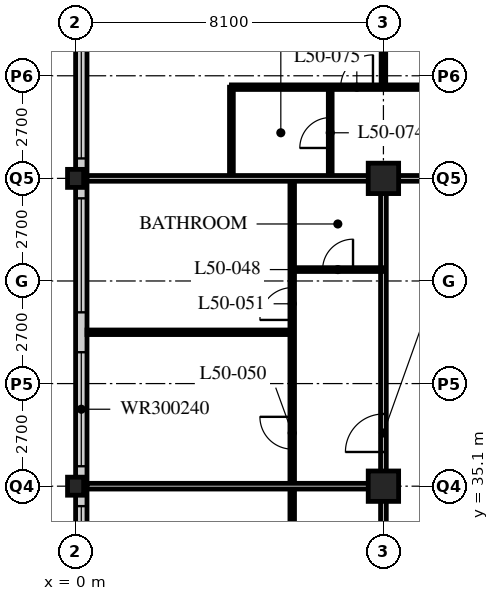
"""IFC4 building model, lengths in metres.
Left out: names, types, materials, properties, quantities, classifications, styles, units other than length and angle.
Written with IfcOpenShell. Run it as: python <this file> out.ifc"""

import sys

from ifc_helpers import new_model, si_unit, direction, frame, frame_2d, origin, origin_2d, place, context, subcontext, project, spatial, rectangle, hollow_rectangle, i_section, extrude, element, fill, save


model = new_model("IFC4")
c1 = context("Model", 3, precision=1e-05, world=origin(), true_north=direction((0.0, 1.0)))
c2 = subcontext(c1, "Body", "Model", "MODEL_VIEW")
j1 = project(units=[si_unit("LENGTHUNIT", "METRE"), si_unit("PLANEANGLEUNIT", "RADIAN")], contexts=[c1])
p1 = place(None, origin())
s1 = spatial("IfcSite", under=j1, at=p1, CompositionType="ELEMENT")
p2 = place(p1, origin())
s2 = spatial("IfcBuilding", under=s1, at=p2, CompositionType="ELEMENT")
p3 = place(p2, frame((0.0, 0.0, 195.6)))
s3 = spatial("IfcBuildingStorey", under=s2, at=p3, CompositionType="ELEMENT", Elevation=195.6)
for number, where, z_axis, x_axis in (
    (1, (0.0, 35.1, 0.0), (0.0, 0.0, 1.0), (1.0, 0.0, 0.0)),
    (2, (0.0, 43.2, 0.0), (0.0, 0.0, 1.0), (1.0, 0.0, 0.0)),
):
    element("IfcColumn", number, at=place(p3, frame(where, z_axis=z_axis, x_axis=x_axis)), inside=s3, PredefinedType="COLUMN", context=c2, shape_type="SweptSolid", body=[
        extrude(i_section(OverallWidth=0.424, OverallDepth=0.475, WebThickness=0.048, FlangeThickness=0.077, FilletRadius=0.015, at=origin_2d()), origin(), (0.0, 0.0, 1.0), 3.6),
    ])
for number, where, z_axis, x_axis in (
    (3, (8.1, 35.1, 0.0), (0.0, 0.0, 1.0), (1.0, 0.0, 0.0)),
    (4, (8.1, 43.2, 0.0), (0.0, 0.0, 1.0), (1.0, 0.0, 0.0)),
):
    element("IfcColumn", number, at=place(p3, frame(where, z_axis=z_axis, x_axis=x_axis)), inside=s3, PredefinedType="COLUMN", context=c2, shape_type="SweptSolid", body=[
        extrude(hollow_rectangle(XDim=0.8, YDim=0.8, WallThickness=0.08, at=origin_2d()), origin(), (0.0, 0.0, 1.0), 3.6),
    ])
p4 = place(p3, frame((0.15, 51.0, 0.0), z_axis=(0.0, 0.0, 1.0), x_axis=(0.0, -1.0, 0.0)))
e5 = element("IfcWall", 5, at=p4, inside=s3, PredefinedType="SOLIDWALL", context=c2, shape_type="SweptSolid", body=[
    extrude(rectangle(XDim=32.1, YDim=0.3, at=frame_2d((16.05, 0.0))), origin(), (0.0, 0.0, 1.0), 3.39),
])
p5 = place(p4, frame((0.225, 0.0, 0.6)))
e6 = element("IfcOpeningElement", 6, at=p5, cuts=e5, PredefinedType="OPENING", context=c2, shape_type="SweptSolid", body=[
    extrude(rectangle(XDim=3.0, YDim=2.4, at=frame_2d((1.5, 1.2))), frame((0.0, 0.16, 0.0), z_axis=(0.0, -1.0, 0.0), x_axis=(1.0, 0.0, 0.0)), (0.0, 0.0, 1.0), 0.32),
])
p6 = place(p4, frame((4.275, 0.0, 0.6)))
e7 = element("IfcOpeningElement", 7, at=p6, cuts=e5, PredefinedType="OPENING", context=c2, shape_type="SweptSolid", body=[
    extrude(rectangle(XDim=3.0, YDim=2.4, at=frame_2d((1.5, 1.2))), frame((0.0, 0.16, 0.0), z_axis=(0.0, -1.0, 0.0), x_axis=(1.0, 0.0, 0.0)), (0.0, 0.0, 1.0), 0.32),
])
p7 = place(p4, frame((8.325, 0.0, 0.6)))
e8 = element("IfcOpeningElement", 8, at=p7, cuts=e5, PredefinedType="OPENING", context=c2, shape_type="SweptSolid", body=[
    extrude(rectangle(XDim=3.0, YDim=2.4, at=frame_2d((1.5, 1.2))), frame((0.0, 0.16, 0.0), z_axis=(0.0, -1.0, 0.0), x_axis=(1.0, 0.0, 0.0)), (0.0, 0.0, 1.0), 0.32),
])
p8 = place(p4, frame((12.375, 0.0, 0.6)))
e9 = element("IfcOpeningElement", 9, at=p8, cuts=e5, PredefinedType="OPENING", context=c2, shape_type="SweptSolid", body=[
    extrude(rectangle(XDim=3.0, YDim=2.4, at=frame_2d((1.5, 1.2))), frame((0.0, 0.16, 0.0), z_axis=(0.0, -1.0, 0.0), x_axis=(1.0, 0.0, 0.0)), (0.0, 0.0, 1.0), 0.32),
])
p9 = place(p4, frame((16.425, 0.0, 0.6)))
e10 = element("IfcOpeningElement", 10, at=p9, cuts=e5, PredefinedType="OPENING", context=c2, shape_type="SweptSolid", body=[
    extrude(rectangle(XDim=3.0, YDim=2.4, at=frame_2d((1.5, 1.2))), frame((0.0, 0.16, 0.0), z_axis=(0.0, -1.0, 0.0), x_axis=(1.0, 0.0, 0.0)), (0.0, 0.0, 1.0), 0.32),
])
p10 = place(p4, frame((20.475, 0.0, 0.6)))
e11 = element("IfcOpeningElement", 11, at=p10, cuts=e5, PredefinedType="OPENING", context=c2, shape_type="SweptSolid", body=[
    extrude(rectangle(XDim=3.0, YDim=2.4, at=frame_2d((1.5, 1.2))), frame((0.0, 0.16, 0.0), z_axis=(0.0, -1.0, 0.0), x_axis=(1.0, 0.0, 0.0)), (0.0, 0.0, 1.0), 0.32),
])
p11 = place(p4, frame((24.525, 0.0, 0.6)))
e12 = element("IfcOpeningElement", 12, at=p11, cuts=e5, PredefinedType="OPENING", context=c2, shape_type="SweptSolid", body=[
    extrude(rectangle(XDim=3.0, YDim=2.4, at=frame_2d((1.5, 1.2))), frame((0.0, 0.16, 0.0), z_axis=(0.0, -1.0, 0.0), x_axis=(1.0, 0.0, 0.0)), (0.0, 0.0, 1.0), 0.32),
])
p12 = place(p4, frame((28.575, 0.0, 0.6)))
e13 = element("IfcOpeningElement", 13, at=p12, cuts=e5, PredefinedType="OPENING", context=c2, shape_type="SweptSolid", body=[
    extrude(rectangle(XDim=3.0, YDim=2.4, at=frame_2d((1.5, 1.2))), frame((0.0, 0.16, 0.0), z_axis=(0.0, -1.0, 0.0), x_axis=(1.0, 0.0, 0.0)), (0.0, 0.0, 1.0), 0.32),
])
p13 = place(p3, frame((8.1, 43.2, 0.0), z_axis=(0.0, 0.0, 1.0), x_axis=(1.0, 0.0, 0.0)))
e14 = element("IfcWall", 14, at=p13, inside=s3, PredefinedType="PARTITIONING", context=c2, shape_type="SweptSolid", body=[
    extrude(rectangle(XDim=40.5, YDim=0.15, at=frame_2d((20.25, 0.0))), origin(), (0.0, 0.0, 1.0), 2.778),
])
p14 = place(p13, frame((4.45, 0.0, 0.0)))
e15 = element("IfcOpeningElement", 15, at=p14, cuts=e14, PredefinedType="OPENING", context=c2, shape_type="SweptSolid", body=[
    extrude(rectangle(XDim=1.0, YDim=2.1, at=frame_2d((0.5, 1.05))), frame((0.0, 0.085, 0.0), z_axis=(0.0, -1.0, 0.0), x_axis=(1.0, 0.0, 0.0)), (0.0, 0.0, 1.0), 0.17),
])
p15 = place(p13, frame((20.65, 0.0, 0.0)))
e16 = element("IfcOpeningElement", 16, at=p15, cuts=e14, PredefinedType="OPENING", context=c2, shape_type="SweptSolid", body=[
    extrude(rectangle(XDim=1.0, YDim=2.1, at=frame_2d((0.5, 1.05))), frame((0.0, 0.085, 0.0), z_axis=(0.0, -1.0, 0.0), x_axis=(1.0, 0.0, 0.0)), (0.0, 0.0, 1.0), 0.17),
])
p16 = place(p13, frame((28.75, 0.0, 0.0)))
e17 = element("IfcOpeningElement", 17, at=p16, cuts=e14, PredefinedType="OPENING", context=c2, shape_type="SweptSolid", body=[
    extrude(rectangle(XDim=1.0, YDim=2.1, at=frame_2d((0.5, 1.05))), frame((0.0, 0.085, 0.0), z_axis=(0.0, -1.0, 0.0), x_axis=(1.0, 0.0, 0.0)), (0.0, 0.0, 1.0), 0.17),
])
p17 = place(p13, frame((37.975, 0.0, 0.0)))
e18 = element("IfcOpeningElement", 18, at=p17, cuts=e14, PredefinedType="OPENING", context=c2, shape_type="SweptSolid", body=[
    extrude(rectangle(XDim=1.0, YDim=2.1, at=frame_2d((0.5, 1.05))), frame((0.0, 0.085, 0.0), z_axis=(0.0, -1.0, 0.0), x_axis=(1.0, 0.0, 0.0)), (0.0, 0.0, 1.0), 0.17),
])
p18 = place(p13, frame((1.525, 0.0, 0.0)))
e19 = element("IfcOpeningElement", 19, at=p18, cuts=e14, PredefinedType="OPENING", context=c2, shape_type="SweptSolid", body=[
    extrude(rectangle(XDim=1.0, YDim=2.1, at=frame_2d((0.5, 1.05))), frame((0.0, 0.085, 0.0), z_axis=(0.0, -1.0, 0.0), x_axis=(1.0, 0.0, 0.0)), (0.0, 0.0, 1.0), 0.17),
])
p19 = place(p3, frame((8.1, 18.9, 0.0), z_axis=(0.0, 0.0, 1.0), x_axis=(0.0, 1.0, 0.0)))
e20 = element("IfcWall", 20, at=p19, inside=s3, PredefinedType="PARTITIONING", context=c2, shape_type="SweptSolid", body=[
    extrude(rectangle(XDim=24.3, YDim=0.15, at=frame_2d((12.15, 0.0))), origin(), (0.0, 0.0, 1.0), 2.778),
])
p20 = place(p19, frame((0.9, 0.0, 0.0)))
e21 = element("IfcOpeningElement", 21, at=p20, cuts=e20, PredefinedType="OPENING", context=c2, shape_type="SweptSolid", body=[
    extrude(rectangle(XDim=1.0, YDim=2.1, at=frame_2d((0.5, 1.05))), frame((0.0, 0.085, 0.0), z_axis=(0.0, -1.0, 0.0), x_axis=(1.0, 0.0, 0.0)), (0.0, 0.0, 1.0), 0.17),
])
p21 = place(p19, frame((9.0, 0.0, 0.0)))
e22 = element("IfcOpeningElement", 22, at=p21, cuts=e20, PredefinedType="OPENING", context=c2, shape_type="SweptSolid", body=[
    extrude(rectangle(XDim=1.0, YDim=2.1, at=frame_2d((0.5, 1.05))), frame((0.0, 0.085, 0.0), z_axis=(0.0, -1.0, 0.0), x_axis=(1.0, 0.0, 0.0)), (0.0, 0.0, 1.0), 0.17),
])
p22 = place(p19, frame((17.1, 0.0, 0.0)))
e23 = element("IfcOpeningElement", 23, at=p22, cuts=e20, PredefinedType="OPENING", context=c2, shape_type="SweptSolid", body=[
    extrude(rectangle(XDim=1.0, YDim=2.1, at=frame_2d((0.5, 1.05))), frame((0.0, 0.085, 0.0), z_axis=(0.0, -1.0, 0.0), x_axis=(1.0, 0.0, 0.0)), (0.0, 0.0, 1.0), 0.17),
])
p23 = place(p3, frame((5.7, 18.9, 0.0), z_axis=(0.0, 0.0, 1.0), x_axis=(0.0, 1.0, 0.0)))
e24 = element("IfcWall", 24, at=p23, inside=s3, PredefinedType="PARTITIONING", context=c2, shape_type="SweptSolid", body=[
    extrude(rectangle(XDim=24.3, YDim=0.12, at=frame_2d((12.15, 0.0))), origin(), (0.0, 0.0, 1.0), 3.39),
])
p24 = place(p23, frame((0.975, 0.0, 0.0)))
e25 = element("IfcOpeningElement", 25, at=p24, cuts=e24, PredefinedType="OPENING", context=c2, shape_type="SweptSolid", body=[
    extrude(rectangle(XDim=0.85, YDim=2.1, at=frame_2d((0.425, 1.05))), frame((0.0, 0.07, 0.0), z_axis=(0.0, -1.0, 0.0), x_axis=(1.0, 0.0, 0.0)), (0.0, 0.0, 1.0), 0.14),
])
p25 = place(p23, frame((4.375, 0.0, 0.0)))
e26 = element("IfcOpeningElement", 26, at=p25, cuts=e24, PredefinedType="OPENING", context=c2, shape_type="SweptSolid", body=[
    extrude(rectangle(XDim=0.85, YDim=2.1, at=frame_2d((0.425, 1.05))), frame((0.0, 0.07, 0.0), z_axis=(0.0, -1.0, 0.0), x_axis=(1.0, 0.0, 0.0)), (0.0, 0.0, 1.0), 0.14),
])
p26 = place(p23, frame((9.075, 0.0, 0.0)))
e27 = element("IfcOpeningElement", 27, at=p26, cuts=e24, PredefinedType="OPENING", context=c2, shape_type="SweptSolid", body=[
    extrude(rectangle(XDim=0.85, YDim=2.1, at=frame_2d((0.425, 1.05))), frame((0.0, 0.07, 0.0), z_axis=(0.0, -1.0, 0.0), x_axis=(1.0, 0.0, 0.0)), (0.0, 0.0, 1.0), 0.14),
])
p27 = place(p23, frame((12.475, 0.0, 0.0)))
e28 = element("IfcOpeningElement", 28, at=p27, cuts=e24, PredefinedType="OPENING", context=c2, shape_type="SweptSolid", body=[
    extrude(rectangle(XDim=0.85, YDim=2.1, at=frame_2d((0.425, 1.05))), frame((0.0, 0.07, 0.0), z_axis=(0.0, -1.0, 0.0), x_axis=(1.0, 0.0, 0.0)), (0.0, 0.0, 1.0), 0.14),
])
p28 = place(p23, frame((17.175, 0.0, 0.0)))
e29 = element("IfcOpeningElement", 29, at=p28, cuts=e24, PredefinedType="OPENING", context=c2, shape_type="SweptSolid", body=[
    extrude(rectangle(XDim=0.85, YDim=2.1, at=frame_2d((0.425, 1.05))), frame((0.0, 0.07, 0.0), z_axis=(0.0, -1.0, 0.0), x_axis=(1.0, 0.0, 0.0)), (0.0, 0.0, 1.0), 0.14),
])
p29 = place(p23, frame((20.575, 0.0, 0.0)))
e30 = element("IfcOpeningElement", 30, at=p29, cuts=e24, PredefinedType="OPENING", context=c2, shape_type="SweptSolid", body=[
    extrude(rectangle(XDim=0.85, YDim=2.1, at=frame_2d((0.425, 1.05))), frame((0.0, 0.07, 0.0), z_axis=(0.0, -1.0, 0.0), x_axis=(1.0, 0.0, 0.0)), (0.0, 0.0, 1.0), 0.14),
])
p30 = place(p3, frame((8.1, 35.1, 0.0), z_axis=(0.0, 0.0, 1.0), x_axis=(-1.0, 0.0, 0.0)))
e31 = element("IfcWall", 31, at=p30, inside=s3, PredefinedType="PARTITIONING", context=c2, shape_type="SweptSolid", body=[
    extrude(rectangle(XDim=7.8, YDim=0.15, at=frame_2d((3.9, 0.0))), origin(), (0.0, 0.0, 1.0), 2.778),
])
p31 = place(p3, frame((8.1, 40.8, 0.0), z_axis=(0.0, 0.0, 1.0), x_axis=(-1.0, 0.0, 0.0)))
e32 = element("IfcWall", 32, at=p31, inside=s3, PredefinedType="PARTITIONING", context=c2, shape_type="SweptSolid", body=[
    extrude(rectangle(XDim=2.4, YDim=0.1, at=frame_2d((1.2, 0.0))), origin(), (0.0, 0.0, 1.0), 3.39),
])
p32 = place(p31, frame((0.8, 0.0, 0.0)))
e33 = element("IfcOpeningElement", 33, at=p32, cuts=e32, PredefinedType="OPENING", context=c2, shape_type="SweptSolid", body=[
    extrude(rectangle(XDim=0.8, YDim=2.1, at=frame_2d((0.4, 1.05))), frame((0.0, 0.06, 0.0), z_axis=(0.0, -1.0, 0.0), x_axis=(1.0, 0.0, 0.0)), (0.0, 0.0, 1.0), 0.12),
])
p33 = place(p3, frame((5.7, 39.15, 0.0), z_axis=(0.0, 0.0, 1.0), x_axis=(-1.0, 0.0, 0.0)))
e34 = element("IfcWall", 34, at=p33, inside=s3, PredefinedType="PARTITIONING", context=c2, shape_type="SweptSolid", body=[
    extrude(rectangle(XDim=5.4, YDim=0.12, at=frame_2d((2.7, 0.0))), origin(), (0.0, 0.0, 1.0), 3.39),
])
p34 = place(p3, frame((6.7, 43.2, 0.0), z_axis=(0.0, 0.0, 1.0), x_axis=(0.0, 1.0, 0.0)))
e35 = element("IfcWall", 35, at=p34, inside=s3, PredefinedType="PARTITIONING", context=c2, shape_type="SweptSolid", body=[
    extrude(rectangle(XDim=2.4, YDim=0.1, at=frame_2d((1.2, 0.0))), origin(), (0.0, 0.0, 1.0), 3.39),
])
p35 = place(p34, frame((0.8, 0.0, 0.0)))
e36 = element("IfcOpeningElement", 36, at=p35, cuts=e35, PredefinedType="OPENING", context=c2, shape_type="SweptSolid", body=[
    extrude(rectangle(XDim=0.8, YDim=2.1, at=frame_2d((0.4, 1.05))), frame((0.0, 0.06, 0.0), z_axis=(0.0, -1.0, 0.0), x_axis=(1.0, 0.0, 0.0)), (0.0, 0.0, 1.0), 0.12),
])
p36 = place(p3, frame((4.1, 43.2, 0.0), z_axis=(0.0, 0.0, 1.0), x_axis=(0.0, 1.0, 0.0)))
e37 = element("IfcWall", 37, at=p36, inside=s3, PredefinedType="PARTITIONING", context=c2, shape_type="SweptSolid", body=[
    extrude(rectangle(XDim=2.4, YDim=0.1, at=frame_2d((1.2, 0.0))), origin(), (0.0, 0.0, 1.0), 3.39),
])
p37 = place(p3, frame((4.1, 45.6, 0.0), z_axis=(0.0, 0.0, 1.0), x_axis=(1.0, 0.0, 0.0)))
e38 = element("IfcWall", 38, at=p37, inside=s3, PredefinedType="PARTITIONING", context=c2, shape_type="SweptSolid", body=[
    extrude(rectangle(XDim=48.5, YDim=0.12, at=frame_2d((24.25, 0.0))), origin(), (0.0, 0.0, 1.0), 3.39),
])
p38 = place(p37, frame((9.025, 0.0, 0.0)))
e39 = element("IfcOpeningElement", 39, at=p38, cuts=e38, PredefinedType="OPENING", context=c2, shape_type="SweptSolid", body=[
    extrude(rectangle(XDim=0.85, YDim=2.1, at=frame_2d((0.425, 1.05))), frame((0.0, 0.07, 0.0), z_axis=(0.0, -1.0, 0.0), x_axis=(1.0, 0.0, 0.0)), (0.0, 0.0, 1.0), 0.14),
])
p39 = place(p37, frame((16.475, 0.0, 0.0)))
e40 = element("IfcOpeningElement", 40, at=p39, cuts=e38, PredefinedType="OPENING", context=c2, shape_type="SweptSolid", body=[
    extrude(rectangle(XDim=0.85, YDim=2.1, at=frame_2d((0.425, 1.05))), frame((0.0, 0.07, 0.0), z_axis=(0.0, -1.0, 0.0), x_axis=(1.0, 0.0, 0.0)), (0.0, 0.0, 1.0), 0.14),
])
p40 = place(p37, frame((20.525, 0.0, 0.0)))
e41 = element("IfcOpeningElement", 41, at=p40, cuts=e38, PredefinedType="OPENING", context=c2, shape_type="SweptSolid", body=[
    extrude(rectangle(XDim=0.85, YDim=2.1, at=frame_2d((0.425, 1.05))), frame((0.0, 0.07, 0.0), z_axis=(0.0, -1.0, 0.0), x_axis=(1.0, 0.0, 0.0)), (0.0, 0.0, 1.0), 0.14),
])
p41 = place(p37, frame((25.225, 0.0, 0.0)))
e42 = element("IfcOpeningElement", 42, at=p41, cuts=e38, PredefinedType="OPENING", context=c2, shape_type="SweptSolid", body=[
    extrude(rectangle(XDim=0.85, YDim=2.1, at=frame_2d((0.425, 1.05))), frame((0.0, 0.07, 0.0), z_axis=(0.0, -1.0, 0.0), x_axis=(1.0, 0.0, 0.0)), (0.0, 0.0, 1.0), 0.14),
])
p42 = place(p37, frame((28.625, 0.0, 0.0)))
e43 = element("IfcOpeningElement", 43, at=p42, cuts=e38, PredefinedType="OPENING", context=c2, shape_type="SweptSolid", body=[
    extrude(rectangle(XDim=0.85, YDim=2.1, at=frame_2d((0.425, 1.05))), frame((0.0, 0.07, 0.0), z_axis=(0.0, -1.0, 0.0), x_axis=(1.0, 0.0, 0.0)), (0.0, 0.0, 1.0), 0.14),
])
p43 = place(p37, frame((33.325, 0.0, 0.0)))
e44 = element("IfcOpeningElement", 44, at=p43, cuts=e38, PredefinedType="OPENING", context=c2, shape_type="SweptSolid", body=[
    extrude(rectangle(XDim=0.85, YDim=2.1, at=frame_2d((0.425, 1.05))), frame((0.0, 0.07, 0.0), z_axis=(0.0, -1.0, 0.0), x_axis=(1.0, 0.0, 0.0)), (0.0, 0.0, 1.0), 0.14),
])
p44 = place(p37, frame((36.725, 0.0, 0.0)))
e45 = element("IfcOpeningElement", 45, at=p44, cuts=e38, PredefinedType="OPENING", context=c2, shape_type="SweptSolid", body=[
    extrude(rectangle(XDim=0.85, YDim=2.1, at=frame_2d((0.425, 1.05))), frame((0.0, 0.07, 0.0), z_axis=(0.0, -1.0, 0.0), x_axis=(1.0, 0.0, 0.0)), (0.0, 0.0, 1.0), 0.14),
])
p45 = place(p37, frame((40.925, 0.0, 0.0)))
e46 = element("IfcOpeningElement", 46, at=p45, cuts=e38, PredefinedType="OPENING", context=c2, shape_type="SweptSolid", body=[
    extrude(rectangle(XDim=0.85, YDim=2.1, at=frame_2d((0.425, 1.05))), frame((0.0, 0.07, 0.0), z_axis=(0.0, -1.0, 0.0), x_axis=(1.0, 0.0, 0.0)), (0.0, 0.0, 1.0), 0.14),
])
p46 = place(p37, frame((44.775, 0.0, 0.0)))
e47 = element("IfcOpeningElement", 47, at=p46, cuts=e38, PredefinedType="OPENING", context=c2, shape_type="SweptSolid", body=[
    extrude(rectangle(XDim=0.85, YDim=2.1, at=frame_2d((0.425, 1.05))), frame((0.0, 0.07, 0.0), z_axis=(0.0, -1.0, 0.0), x_axis=(1.0, 0.0, 0.0)), (0.0, 0.0, 1.0), 0.14),
])
p47 = place(p37, frame((6.725, 0.0, 0.0)))
e48 = element("IfcOpeningElement", 48, at=p47, cuts=e38, PredefinedType="OPENING", context=c2, shape_type="SweptSolid", body=[
    extrude(rectangle(XDim=0.85, YDim=2.1, at=frame_2d((0.425, 1.05))), frame((0.0, 0.07, 0.0), z_axis=(0.0, -1.0, 0.0), x_axis=(1.0, 0.0, 0.0)), (0.0, 0.0, 1.0), 0.14),
])
p48 = place(p37, frame((2.875, 0.0, 0.0)))
e49 = element("IfcOpeningElement", 49, at=p48, cuts=e38, PredefinedType="OPENING", context=c2, shape_type="SweptSolid", body=[
    extrude(rectangle(XDim=0.85, YDim=2.1, at=frame_2d((0.425, 1.05))), frame((0.0, 0.07, 0.0), z_axis=(0.0, -1.0, 0.0), x_axis=(1.0, 0.0, 0.0)), (0.0, 0.0, 1.0), 0.14),
])
p49 = place(p3, frame((8.1, 45.6, 0.0), z_axis=(0.0, 0.0, 1.0), x_axis=(0.0, 1.0, 0.0)))
e50 = element("IfcWall", 50, at=p49, inside=s3, PredefinedType="PARTITIONING", context=c2, shape_type="SweptSolid", body=[
    extrude(rectangle(XDim=9.45, YDim=0.12, at=frame_2d((4.725, 0.0))), origin(), (0.0, 0.0, 1.0), 2.778),
])
p50 = place(p3, frame((0.3, 43.2, 0.0), z_axis=(0.0, 0.0, 1.0), x_axis=(1.0, 0.0, 0.0)))
e51 = element("IfcWall", 51, at=p50, inside=s3, PredefinedType="PARTITIONING", context=c2, shape_type="SweptSolid", body=[
    extrude(rectangle(XDim=7.8, YDim=0.15, at=frame_2d((3.9, 0.0))), origin(), (0.0, 0.0, 1.0), 2.778),
])
p51 = place(p6, origin())
e52 = element("IfcWindow", 52, at=p51, inside=s3, PartitioningType="SINGLE_PANEL", PredefinedType="WINDOW", context=c2, shape_type="SweptSolid", body=[
    extrude(rectangle(XDim=3.0, YDim=2.4, at=frame_2d((1.5, 1.2))), frame((0.0, 0.03, 0.0), z_axis=(0.0, -1.0, 0.0), x_axis=(1.0, 0.0, 0.0)), (0.0, 0.0, 1.0), 0.06),
])
fill(e7, e52)
p52 = place(p7, origin())
e53 = element("IfcWindow", 53, at=p52, inside=s3, PartitioningType="SINGLE_PANEL", PredefinedType="WINDOW", context=c2, shape_type="SweptSolid", body=[
    extrude(rectangle(XDim=3.0, YDim=2.4, at=frame_2d((1.5, 1.2))), frame((0.0, 0.03, 0.0), z_axis=(0.0, -1.0, 0.0), x_axis=(1.0, 0.0, 0.0)), (0.0, 0.0, 1.0), 0.06),
])
fill(e8, e53)
p53 = place(p8, origin())
e54 = element("IfcWindow", 54, at=p53, inside=s3, PartitioningType="SINGLE_PANEL", PredefinedType="WINDOW", context=c2, shape_type="SweptSolid", body=[
    extrude(rectangle(XDim=3.0, YDim=2.4, at=frame_2d((1.5, 1.2))), frame((0.0, 0.03, 0.0), z_axis=(0.0, -1.0, 0.0), x_axis=(1.0, 0.0, 0.0)), (0.0, 0.0, 1.0), 0.06),
])
fill(e9, e54)
p54 = place(p9, origin())
e55 = element("IfcWindow", 55, at=p54, inside=s3, PartitioningType="SINGLE_PANEL", PredefinedType="WINDOW", context=c2, shape_type="SweptSolid", body=[
    extrude(rectangle(XDim=3.0, YDim=2.4, at=frame_2d((1.5, 1.2))), frame((0.0, 0.03, 0.0), z_axis=(0.0, -1.0, 0.0), x_axis=(1.0, 0.0, 0.0)), (0.0, 0.0, 1.0), 0.06),
])
fill(e10, e55)
p55 = place(p32, origin())
e56 = element("IfcDoor", 56, at=p55, inside=s3, OperationType="SINGLE_SWING_RIGHT", PredefinedType="DOOR", context=c2, shape_type="SweptSolid", body=[
    extrude(rectangle(XDim=0.8, YDim=2.1, at=frame_2d((0.4, 1.05))), frame((0.0, 0.025, 0.0), z_axis=(0.0, -1.0, 0.0), x_axis=(1.0, 0.0, 0.0)), (0.0, 0.0, 1.0), 0.05),
])
fill(e33, e56)
p56 = place(p22, origin())
e57 = element("IfcDoor", 57, at=p56, inside=s3, OperationType="SINGLE_SWING_LEFT", PredefinedType="DOOR", context=c2, shape_type="SweptSolid", body=[
    extrude(rectangle(XDim=1.0, YDim=2.1, at=frame_2d((0.5, 1.05))), frame((0.0, 0.025, 0.0), z_axis=(0.0, -1.0, 0.0), x_axis=(1.0, 0.0, 0.0)), (0.0, 0.0, 1.0), 0.05),
])
fill(e23, e57)
p57 = place(p28, origin())
e58 = element("IfcDoor", 58, at=p57, inside=s3, OperationType="SINGLE_SWING_RIGHT", PredefinedType="DOOR", context=c2, shape_type="SweptSolid", body=[
    extrude(rectangle(XDim=0.85, YDim=2.1, at=frame_2d((0.425, 1.05))), frame((0.0, 0.025, 0.0), z_axis=(0.0, -1.0, 0.0), x_axis=(1.0, 0.0, 0.0)), (0.0, 0.0, 1.0), 0.05),
])
fill(e29, e58)
p58 = place(p29, origin())
e59 = element("IfcDoor", 59, at=p58, inside=s3, OperationType="SINGLE_SWING_LEFT", PredefinedType="DOOR", context=c2, shape_type="SweptSolid", body=[
    extrude(rectangle(XDim=0.85, YDim=2.1, at=frame_2d((0.425, 1.05))), frame((0.0, 0.025, 0.0), z_axis=(0.0, -1.0, 0.0), x_axis=(1.0, 0.0, 0.0)), (0.0, 0.0, 1.0), 0.05),
])
fill(e30, e59)
p59 = place(p35, origin())
e60 = element("IfcDoor", 60, at=p59, inside=s3, OperationType="SINGLE_SWING_LEFT", PredefinedType="DOOR", context=c2, shape_type="SweptSolid", body=[
    extrude(rectangle(XDim=0.8, YDim=2.1, at=frame_2d((0.4, 1.05))), frame((0.0, 0.025, 0.0), z_axis=(0.0, -1.0, 0.0), x_axis=(1.0, 0.0, 0.0)), (0.0, 0.0, 1.0), 0.05),
])
fill(e36, e60)
p60 = place(p48, origin())
e61 = element("IfcDoor", 61, at=p60, inside=s3, OperationType="SINGLE_SWING_RIGHT", PredefinedType="DOOR", context=c2, shape_type="SweptSolid", body=[
    extrude(rectangle(XDim=0.85, YDim=2.1, at=frame_2d((0.425, 1.05))), frame((0.0, 0.025, 0.0), z_axis=(0.0, -1.0, 0.0), x_axis=(1.0, 0.0, 0.0)), (0.0, 0.0, 1.0), 0.05),
])
fill(e49, e61)
save(model, sys.argv[1])
